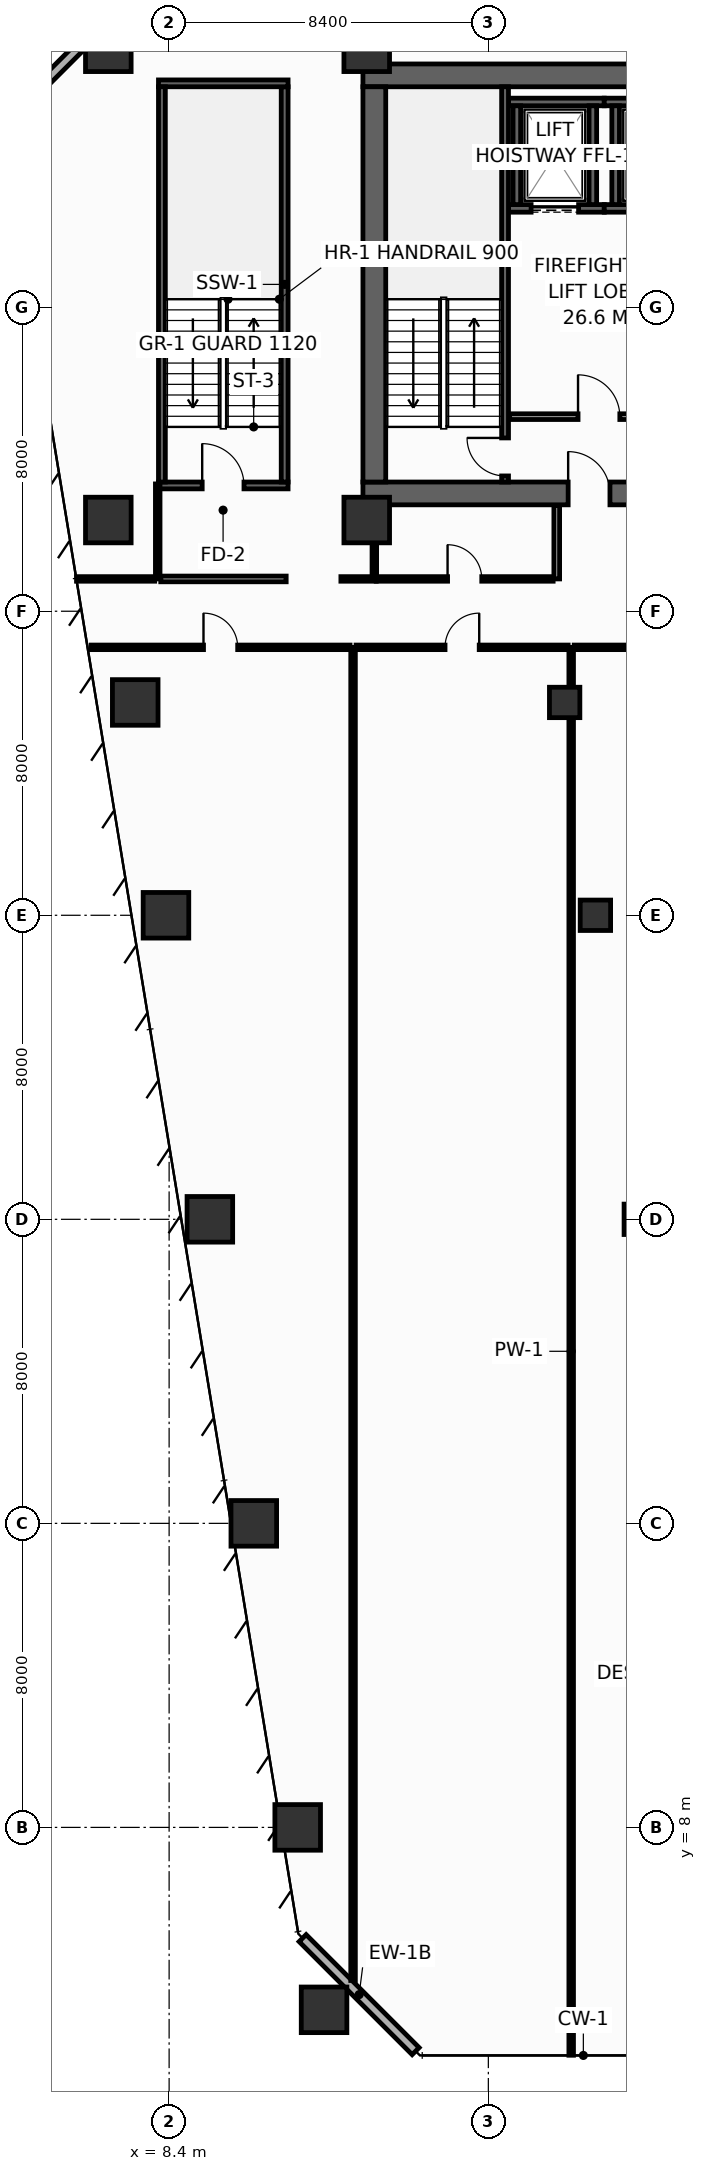
"""IFC4 building model, lengths in metres.
Left out: names, types, materials, properties, quantities, classifications, styles, units other than length and angle.
Written with IfcOpenShell. Run it as: python <this file> out.ifc"""

import sys

from ifc_helpers import new_model, si_unit, direction, frame, frame_2d, origin, origin_2d, place, context, subcontext, project, spatial, rectangle, hollow_rectangle, extrude, element, fill, save


model = new_model("IFC4")
c1 = context("Model", 3, precision=1e-05, world=origin(), true_north=direction((0.0, 1.0)))
c2 = subcontext(c1, "Body", "Model", "MODEL_VIEW")
j1 = project(units=[si_unit("LENGTHUNIT", "METRE"), si_unit("PLANEANGLEUNIT", "RADIAN")], contexts=[c1])
p1 = place(None, origin())
s1 = spatial("IfcSite", under=j1, at=p1, CompositionType="ELEMENT")
p2 = place(p1, origin())
s2 = spatial("IfcBuilding", under=s1, at=p2, CompositionType="ELEMENT")
p3 = place(p2, frame((0.0, 0.0, 69.2)))
s3 = spatial("IfcBuildingStorey", under=s2, at=p3, CompositionType="ELEMENT", Elevation=69.2)
p4 = place(p3, frame((13.5, 43.1, 0.0), z_axis=(0.0, 0.0, 1.0), x_axis=(1.0, 0.0, 0.0)))
e1 = element("IfcWall", 1, at=p4, inside=s3, PredefinedType="SHEAR", context=c2, shape_type="SweptSolid", body=[
    extrude(rectangle(XDim=32.9, YDim=0.6, at=frame_2d((16.45, 0.0))), origin(), (0.0, 0.0, 1.0), 4.15),
])
p5 = place(p4, frame((5.4, 0.0, 0.0)))
e2 = element("IfcOpeningElement", 2, at=p5, cuts=e1, PredefinedType="OPENING", context=c2, shape_type="SweptSolid", body=[
    extrude(rectangle(XDim=1.1, YDim=2.15, at=frame_2d((0.55, 1.075))), frame((0.0, 0.31, 0.0), z_axis=(0.0, -1.0, 0.0), x_axis=(1.0, 0.0, 0.0)), (0.0, 0.0, 1.0), 0.62),
])
p6 = place(p4, frame((25.6, 0.0, 0.0)))
e3 = element("IfcOpeningElement", 3, at=p6, cuts=e1, PredefinedType="OPENING", context=c2, shape_type="SweptSolid", body=[
    extrude(rectangle(XDim=1.1, YDim=2.15, at=frame_2d((0.55, 1.075))), frame((0.0, 0.31, 0.0), z_axis=(0.0, -1.0, 0.0), x_axis=(1.0, 0.0, 0.0)), (0.0, 0.0, 1.0), 0.62),
])
p7 = place(p3, frame((13.5, 54.1, 0.0), z_axis=(0.0, 0.0, 1.0), x_axis=(1.0, 0.0, 0.0)))
e4 = element("IfcWall", 4, at=p7, inside=s3, PredefinedType="SHEAR", context=c2, shape_type="SweptSolid", body=[
    extrude(rectangle(XDim=32.9, YDim=0.6, at=frame_2d((16.45, 0.0))), origin(), (0.0, 0.0, 1.0), 4.15),
])
p8 = place(p3, frame((13.8, 43.4, 0.0), z_axis=(0.0, 0.0, 1.0), x_axis=(0.0, 1.0, 0.0)))
e5 = element("IfcWall", 5, at=p8, inside=s3, PredefinedType="SHEAR", context=c2, shape_type="SweptSolid", body=[
    extrude(rectangle(XDim=10.4, YDim=0.6, at=frame_2d((5.2, 0.0))), origin(), (0.0, 0.0, 1.0), 4.15),
])
for number, where, z_axis, x_axis in (
    (6, (6.8, 54.8, 0.0), (0.0, 0.0, 1.0), (1.0, 0.0, 0.0)),
    (7, (13.6, 54.8, 0.0), (0.0, 0.0, 1.0), (1.0, 0.0, 0.0)),
    (8, (6.8, 42.4, 0.0), (0.0, 0.0, 1.0), (1.0, 0.0, 0.0)),
    (9, (13.6, 42.4, 0.0), (0.0, 0.0, 1.0), (1.0, 0.0, 0.0)),
    (10, (12.477, 3.2, 0.0), (0.0, 0.0, 1.0), (1.0, 0.0, 0.0)),
    (11, (11.783, 8.0, 0.0), (0.0, 0.0, 1.0), (1.0, 0.0, 0.0)),
    (12, (10.628, 16.0, 0.0), (0.0, 0.0, 1.0), (1.0, 0.0, 0.0)),
    (13, (9.472, 24.0, 0.0), (0.0, 0.0, 1.0), (1.0, 0.0, 0.0)),
):
    element("IfcColumn", number, at=place(p3, frame(where, z_axis=z_axis, x_axis=x_axis)), inside=s3, PredefinedType="COLUMN", context=c2, shape_type="SweptSolid", body=[
        extrude(hollow_rectangle(XDim=1.2, YDim=1.2, WallThickness=0.055, at=origin_2d()), origin(), (0.0, 0.0, 1.0), 4.4),
    ])
p9 = place(p3, frame((20.772, 24.0, 0.0), z_axis=(0.0, 0.0, 1.0), x_axis=(1.0, 0.0, 0.0)))
e14 = element("IfcColumn", 14, at=p9, inside=s3, PredefinedType="COLUMN", context=c2, shape_type="SweptSolid", body=[
    extrude(hollow_rectangle(XDim=0.8, YDim=0.8, WallThickness=0.036, at=origin_2d()), origin(), (0.0, 0.0, 1.0), 4.4),
])
p10 = place(p3, frame((8.317, 32.0, 0.0), z_axis=(0.0, 0.0, 1.0), x_axis=(1.0, 0.0, 0.0)))
e15 = element("IfcColumn", 15, at=p10, inside=s3, PredefinedType="COLUMN", context=c2, shape_type="SweptSolid", body=[
    extrude(hollow_rectangle(XDim=1.2, YDim=1.2, WallThickness=0.055, at=origin_2d()), origin(), (0.0, 0.0, 1.0), 4.4),
])
p11 = place(p3, frame((19.617, 32.0, 0.0), z_axis=(0.0, 0.0, 1.0), x_axis=(1.0, 0.0, 0.0)))
e16 = element("IfcColumn", 16, at=p11, inside=s3, PredefinedType="COLUMN", context=c2, shape_type="SweptSolid", body=[
    extrude(hollow_rectangle(XDim=0.8, YDim=0.8, WallThickness=0.036, at=origin_2d()), origin(), (0.0, 0.0, 1.0), 4.4),
])
p12 = place(p3, frame((7.508, 37.6, 0.0), z_axis=(0.0, 0.0, 1.0), x_axis=(1.0, 0.0, 0.0)))
e17 = element("IfcColumn", 17, at=p12, inside=s3, PredefinedType="COLUMN", context=c2, shape_type="SweptSolid", body=[
    extrude(hollow_rectangle(XDim=1.2, YDim=1.2, WallThickness=0.055, at=origin_2d()), origin(), (0.0, 0.0, 1.0), 4.4),
])
p13 = place(p3, frame((18.808, 37.6, 0.0), z_axis=(0.0, 0.0, 1.0), x_axis=(1.0, 0.0, 0.0)))
e18 = element("IfcColumn", 18, at=p13, inside=s3, PredefinedType="COLUMN", context=c2, shape_type="SweptSolid", body=[
    extrude(hollow_rectangle(XDim=0.8, YDim=0.8, WallThickness=0.036, at=origin_2d()), origin(), (0.0, 0.0, 1.0), 4.4),
])
p14 = place(p3, frame((17.33, 50.6, 0.0), z_axis=(0.0, 0.0, 1.0), x_axis=(1.0, 0.0, 0.0)))
e19 = element("IfcWall", 19, at=p14, inside=s3, PredefinedType="SHEAR", context=c2, shape_type="SweptSolid", body=[
    extrude(rectangle(XDim=2.52, YDim=0.2, at=frame_2d((1.26, 0.0))), origin(), (0.0, 0.0, 1.0), 4.15),
])
p15 = place(p14, frame((0.595, 0.0, 0.0)))
e20 = element("IfcOpeningElement", 20, at=p15, cuts=e19, PredefinedType="OPENING", context=c2, shape_type="SweptSolid", body=[
    extrude(rectangle(XDim=1.25, YDim=2.3, at=frame_2d((0.625, 1.15))), frame((0.0, 0.11, 0.0), z_axis=(0.0, -1.0, 0.0), x_axis=(1.0, 0.0, 0.0)), (0.0, 0.0, 1.0), 0.22),
])
p16 = place(p3, frame((17.33, 53.4, 0.0), z_axis=(0.0, 0.0, 1.0), x_axis=(1.0, 0.0, 0.0)))
e21 = element("IfcWall", 21, at=p16, inside=s3, PredefinedType="SHEAR", context=c2, shape_type="SweptSolid", body=[
    extrude(rectangle(XDim=2.52, YDim=0.2, at=frame_2d((1.26, 0.0))), origin(), (0.0, 0.0, 1.0), 4.15),
])
for number, where, z_axis, x_axis in (
    (22, (17.55, 50.7, 0.0), (0.0, 0.0, 1.0), (0.0, 1.0, 0.0)),
    (23, (19.55, 50.7, 0.0), (0.0, 0.0, 1.0), (0.0, 1.0, 0.0)),
):
    element("IfcWall", number, at=place(p3, frame(where, z_axis=z_axis, x_axis=x_axis)), inside=s3, PredefinedType="SHEAR", context=c2, shape_type="SweptSolid", body=[
        extrude(rectangle(XDim=2.6, YDim=0.2, at=frame_2d((1.3, 0.0))), origin(), (0.0, 0.0, 1.0), 4.15),
    ])
p17 = place(p3, frame((19.85, 50.6, 0.0), z_axis=(0.0, 0.0, 1.0), x_axis=(1.0, 0.0, 0.0)))
e24 = element("IfcWall", 24, at=p17, inside=s3, PredefinedType="SHEAR", context=c2, shape_type="SweptSolid", body=[
    extrude(rectangle(XDim=2.65, YDim=0.2, at=frame_2d((1.325, 0.0))), origin(), (0.0, 0.0, 1.0), 4.15),
])
p18 = place(p17, frame((0.675, 0.0, 0.0)))
e25 = element("IfcOpeningElement", 25, at=p18, cuts=e24, PredefinedType="OPENING", context=c2, shape_type="SweptSolid", body=[
    extrude(rectangle(XDim=1.25, YDim=2.3, at=frame_2d((0.625, 1.15))), frame((0.0, 0.11, 0.0), z_axis=(0.0, -1.0, 0.0), x_axis=(1.0, 0.0, 0.0)), (0.0, 0.0, 1.0), 0.22),
])
p19 = place(p3, frame((19.85, 53.4, 0.0), z_axis=(0.0, 0.0, 1.0), x_axis=(1.0, 0.0, 0.0)))
e26 = element("IfcWall", 26, at=p19, inside=s3, PredefinedType="SHEAR", context=c2, shape_type="SweptSolid", body=[
    extrude(rectangle(XDim=2.65, YDim=0.2, at=frame_2d((1.325, 0.0))), origin(), (0.0, 0.0, 1.0), 4.15),
])
p20 = place(p3, frame((20.15, 50.7, 0.0), z_axis=(0.0, 0.0, 1.0), x_axis=(0.0, 1.0, 0.0)))
e27 = element("IfcWall", 27, at=p20, inside=s3, PredefinedType="SHEAR", context=c2, shape_type="SweptSolid", body=[
    extrude(rectangle(XDim=2.6, YDim=0.2, at=frame_2d((1.3, 0.0))), origin(), (0.0, 0.0, 1.0), 4.15),
])
p21 = place(p3, frame((17.24, 43.4, 0.0), z_axis=(0.0, 0.0, 1.0), x_axis=(0.0, 1.0, 0.0)))
e28 = element("IfcWall", 28, at=p21, inside=s3, PredefinedType="SHEAR", context=c2, shape_type="SweptSolid", body=[
    extrude(rectangle(XDim=10.4, YDim=0.18, at=frame_2d((5.2, 0.0))), origin(), (0.0, 0.0, 1.0), 4.15),
])
p22 = place(p21, frame((0.16, 0.0, 0.0)))
e29 = element("IfcOpeningElement", 29, at=p22, cuts=e28, PredefinedType="OPENING", context=c2, shape_type="SweptSolid", body=[
    extrude(rectangle(XDim=1.0, YDim=2.15, at=frame_2d((0.5, 1.075))), frame((0.0, 0.1, 0.0), z_axis=(0.0, -1.0, 0.0), x_axis=(1.0, 0.0, 0.0)), (0.0, 0.0, 1.0), 0.2),
])
p23 = place(p3, frame((8.12, 43.31, 0.0), z_axis=(0.0, 0.0, 1.0), x_axis=(1.0, 0.0, 0.0)))
e30 = element("IfcWall", 30, at=p23, inside=s3, PredefinedType="SHEAR", context=c2, shape_type="SweptSolid", body=[
    extrude(rectangle(XDim=3.41, YDim=0.18, at=frame_2d((1.705, 0.0))), origin(), (0.0, 0.0, 1.0), 4.15),
])
p24 = place(p23, frame((1.15, 0.0, 0.0)))
e31 = element("IfcOpeningElement", 31, at=p24, cuts=e30, PredefinedType="OPENING", context=c2, shape_type="SweptSolid", body=[
    extrude(rectangle(XDim=1.1, YDim=2.15, at=frame_2d((0.55, 1.075))), frame((0.0, 0.1, 0.0), z_axis=(0.0, -1.0, 0.0), x_axis=(1.0, 0.0, 0.0)), (0.0, 0.0, 1.0), 0.2),
])
p25 = place(p3, frame((11.44, 43.4, 0.0), z_axis=(0.0, 0.0, 1.0), x_axis=(0.0, 1.0, 0.0)))
e32 = element("IfcWall", 32, at=p25, inside=s3, PredefinedType="SHEAR", context=c2, shape_type="SweptSolid", body=[
    extrude(rectangle(XDim=10.4, YDim=0.18, at=frame_2d((5.2, 0.0))), origin(), (0.0, 0.0, 1.0), 4.15),
])
p26 = place(p3, frame((11.53, 53.89, 0.0), z_axis=(0.0, 0.0, 1.0), x_axis=(-1.0, 0.0, 0.0)))
e33 = element("IfcWall", 33, at=p26, inside=s3, PredefinedType="SHEAR", context=c2, shape_type="SweptSolid", body=[
    extrude(rectangle(XDim=3.41, YDim=0.18, at=frame_2d((1.705, 0.0))), origin(), (0.0, 0.0, 1.0), 4.15),
])
p27 = place(p3, frame((8.21, 53.8, 0.0), z_axis=(0.0, 0.0, 1.0), x_axis=(0.0, -1.0, 0.0)))
e34 = element("IfcWall", 34, at=p27, inside=s3, PredefinedType="SHEAR", context=c2, shape_type="SweptSolid", body=[
    extrude(rectangle(XDim=10.4, YDim=0.18, at=frame_2d((5.2, 0.0))), origin(), (0.0, 0.0, 1.0), 4.15),
])
p28 = place(p3, frame((17.36, 45.12, 0.0), z_axis=(0.0, 0.0, 1.0), x_axis=(1.0, 0.0, 0.0)))
e35 = element("IfcWall", 35, at=p28, inside=s3, PredefinedType="PARTITIONING", context=c2, shape_type="SweptSolid", body=[
    extrude(rectangle(XDim=5.14, YDim=0.15, at=frame_2d((2.57, 0.0))), origin(), (0.0, 0.0, 1.0), 4.15),
])
p29 = place(p28, frame((1.8, 0.0, 0.0)))
e36 = element("IfcOpeningElement", 36, at=p29, cuts=e35, PredefinedType="OPENING", context=c2, shape_type="SweptSolid", body=[
    extrude(rectangle(XDim=1.1, YDim=2.15, at=frame_2d((0.55, 1.075))), frame((0.0, 0.085, 0.0), z_axis=(0.0, -1.0, 0.0), x_axis=(1.0, 0.0, 0.0)), (0.0, 0.0, 1.0), 0.17),
])
for number, where, z_axis, x_axis in (
    (37, (11.913, 5.087, 0.0), (0.0, 0.0, 1.0), (0.707, -0.707, 0.0)),
    (38, (7.087, 55.887, 0.0), (0.0, 0.0, 1.0), (-0.707, -0.707, 0.0)),
):
    element("IfcWall", number, at=place(p3, frame(where, z_axis=z_axis, x_axis=x_axis)), inside=s3, PredefinedType="STANDARD", context=c2, shape_type="SweptSolid", body=[
        extrude(rectangle(XDim=4.206, YDim=0.26, at=frame_2d((2.103, 0.0))), origin(), (0.0, 0.0, 1.0), 4.15),
    ])
p30 = place(p3, frame((12.92, 40.85, 0.0), z_axis=(0.0, 0.0, 1.0), x_axis=(1.0, 0.0, 0.0)))
e39 = element("IfcWall", 39, at=p30, inside=s3, PredefinedType="PARTITIONING", context=c2, shape_type="SweptSolid", body=[
    extrude(rectangle(XDim=0.93, YDim=0.12, at=frame_2d((0.465, 0.0))), origin(), (0.0, 0.0, 1.0), 4.15),
])
p31 = place(p3, frame((13.8, 40.93, 0.0), z_axis=(0.0, 0.0, 1.0), x_axis=(0.0, 1.0, 0.0)))
e40 = element("IfcWall", 40, at=p31, inside=s3, PredefinedType="PARTITIONING", context=c2, shape_type="SweptSolid", body=[
    extrude(rectangle(XDim=1.85, YDim=0.12, at=frame_2d((0.925, 0.0))), origin(), (0.0, 0.0, 1.0), 4.15),
])
p32 = place(p3, frame((8.1, 40.85, 0.0), z_axis=(0.0, 0.0, 1.0), x_axis=(0.0, 1.0, 0.0)))
e41 = element("IfcWall", 41, at=p32, inside=s3, PredefinedType="PARTITIONING", context=c2, shape_type="SweptSolid", body=[
    extrude(rectangle(XDim=2.5, YDim=0.12, at=frame_2d((1.25, 0.0))), origin(), (0.0, 0.0, 1.0), 3.335),
])
p33 = place(p3, frame((8.18, 40.85, 0.0), z_axis=(0.0, 0.0, 1.0), x_axis=(1.0, 0.0, 0.0)))
e42 = element("IfcWall", 42, at=p33, inside=s3, PredefinedType="PARTITIONING", context=c2, shape_type="SweptSolid", body=[
    extrude(rectangle(XDim=3.3, YDim=0.15, at=frame_2d((1.65, 0.0))), origin(), (0.0, 0.0, 1.0), 4.15),
])
p34 = place(p3, frame((5.963, 40.85, 0.0), z_axis=(0.0, 0.0, 1.0), x_axis=(1.0, 0.0, 0.0)))
e43 = element("IfcWall", 43, at=p34, inside=s3, PredefinedType="PARTITIONING", context=c2, shape_type="SweptSolid", body=[
    extrude(rectangle(XDim=2.057, YDim=0.12, at=frame_2d((1.028, 0.0))), origin(), (0.0, 0.0, 1.0), 3.635),
])
p35 = place(p3, frame((18.6, 40.85, 0.0), z_axis=(0.0, 0.0, 1.0), x_axis=(0.0, 1.0, 0.0)))
e44 = element("IfcWall", 44, at=p35, inside=s3, PredefinedType="PARTITIONING", context=c2, shape_type="SweptSolid", body=[
    extrude(rectangle(XDim=1.93, YDim=0.15, at=frame_2d((0.965, 0.0))), origin(), (0.0, 0.0, 1.0), 4.15),
])
p36 = place(p3, frame((13.85, 40.85, 0.0), z_axis=(0.0, 0.0, 1.0), x_axis=(1.0, 0.0, 0.0)))
e45 = element("IfcWall", 45, at=p36, inside=s3, PredefinedType="PARTITIONING", context=c2, shape_type="SweptSolid", body=[
    extrude(rectangle(XDim=4.655, YDim=0.12, at=frame_2d((2.327, 0.0))), origin(), (0.0, 0.0, 1.0), 4.15),
])
p37 = place(p36, frame((1.877, 0.0, 0.0)))
e46 = element("IfcOpeningElement", 46, at=p37, cuts=e45, PredefinedType="OPENING", context=c2, shape_type="SweptSolid", body=[
    extrude(rectangle(XDim=0.9, YDim=2.1, at=frame_2d((0.45, 1.05))), frame((0.0, 0.07, 0.0), z_axis=(0.0, -1.0, 0.0), x_axis=(1.0, 0.0, 0.0)), (0.0, 0.0, 1.0), 0.14),
])
p38 = place(p3, frame((13.24, 3.972, 0.0), z_axis=(0.0, 0.0, 1.0), x_axis=(0.0, 1.0, 0.0)))
e47 = element("IfcWall", 47, at=p38, inside=s3, PredefinedType="PARTITIONING", context=c2, shape_type="SweptSolid", body=[
    extrude(rectangle(XDim=35.078, YDim=0.12, at=frame_2d((17.539, 0.0))), origin(), (0.0, 0.0, 1.0), 3.335),
])
p39 = place(p3, frame((18.98, 2.005, 0.0), z_axis=(0.0, 0.0, 1.0), x_axis=(0.0, 1.0, 0.0)))
e48 = element("IfcWall", 48, at=p39, inside=s3, PredefinedType="PARTITIONING", context=c2, shape_type="SweptSolid", body=[
    extrude(rectangle(XDim=37.045, YDim=0.12, at=frame_2d((18.522, 0.0))), origin(), (0.0, 0.0, 1.0), 3.335),
])
p40 = place(p3, frame((6.348, 39.05, 0.0), z_axis=(0.0, 0.0, 1.0), x_axis=(1.0, 0.0, 0.0)))
e49 = element("IfcWall", 49, at=p40, inside=s3, PredefinedType="PARTITIONING", context=c2, shape_type="SweptSolid", body=[
    extrude(rectangle(XDim=6.812, YDim=0.12, at=frame_2d((3.406, 0.0))), origin(), (0.0, 0.0, 1.0), 3.635),
])
p41 = place(p40, frame((2.956, 0.0, 0.0)))
e50 = element("IfcOpeningElement", 50, at=p41, cuts=e49, PredefinedType="OPENING", context=c2, shape_type="SweptSolid", body=[
    extrude(rectangle(XDim=0.9, YDim=2.1, at=frame_2d((0.45, 1.05))), frame((0.0, 0.07, 0.0), z_axis=(0.0, -1.0, 0.0), x_axis=(1.0, 0.0, 0.0)), (0.0, 0.0, 1.0), 0.14),
])
p42 = place(p3, frame((13.32, 39.05, 0.0), z_axis=(0.0, 0.0, 1.0), x_axis=(1.0, 0.0, 0.0)))
e51 = element("IfcWall", 51, at=p42, inside=s3, PredefinedType="PARTITIONING", context=c2, shape_type="SweptSolid", body=[
    extrude(rectangle(XDim=5.58, YDim=0.12, at=frame_2d((2.79, 0.0))), origin(), (0.0, 0.0, 1.0), 4.15),
])
p43 = place(p42, frame((2.34, 0.0, 0.0)))
e52 = element("IfcOpeningElement", 52, at=p43, cuts=e51, PredefinedType="OPENING", context=c2, shape_type="SweptSolid", body=[
    extrude(rectangle(XDim=0.9, YDim=2.1, at=frame_2d((0.45, 1.05))), frame((0.0, 0.07, 0.0), z_axis=(0.0, -1.0, 0.0), x_axis=(1.0, 0.0, 0.0)), (0.0, 0.0, 1.0), 0.14),
])
p44 = place(p3, frame((19.06, 39.05, 0.0), z_axis=(0.0, 0.0, 1.0), x_axis=(1.0, 0.0, 0.0)))
e53 = element("IfcWall", 53, at=p44, inside=s3, PredefinedType="PARTITIONING", context=c2, shape_type="SweptSolid", body=[
    extrude(rectangle(XDim=4.79, YDim=0.12, at=frame_2d((2.395, 0.0))), origin(), (0.0, 0.0, 1.0), 3.335),
])
p45 = place(p44, frame((1.945, 0.0, 0.0)))
e54 = element("IfcOpeningElement", 54, at=p45, cuts=e53, PredefinedType="OPENING", context=c2, shape_type="SweptSolid", body=[
    extrude(rectangle(XDim=0.9, YDim=2.1, at=frame_2d((0.45, 1.05))), frame((0.0, 0.07, 0.0), z_axis=(0.0, -1.0, 0.0), x_axis=(1.0, 0.0, 0.0)), (0.0, 0.0, 1.0), 0.14),
])
p46 = place(p15, origin())
e55 = element("IfcDoor", 55, at=p46, inside=s3, OperationType="SLIDING_TO_LEFT", PredefinedType="DOOR", context=c2, shape_type="SweptSolid", body=[
    extrude(rectangle(XDim=1.25, YDim=2.3, at=frame_2d((0.625, 1.15))), frame((0.0, 0.025, 0.0), z_axis=(0.0, -1.0, 0.0), x_axis=(1.0, 0.0, 0.0)), (0.0, 0.0, 1.0), 0.05),
])
fill(e20, e55)
p47 = place(p22, origin())
e56 = element("IfcDoor", 56, at=p47, inside=s3, OperationType="SINGLE_SWING_RIGHT", PredefinedType="DOOR", context=c2, shape_type="SweptSolid", body=[
    extrude(rectangle(XDim=1.0, YDim=2.15, at=frame_2d((0.5, 1.075))), frame((0.0, 0.025, 0.0), z_axis=(0.0, -1.0, 0.0), x_axis=(1.0, 0.0, 0.0)), (0.0, 0.0, 1.0), 0.05),
])
fill(e29, e56)
p48 = place(p24, origin())
e57 = element("IfcDoor", 57, at=p48, inside=s3, OperationType="SINGLE_SWING_LEFT", PredefinedType="DOOR", context=c2, shape_type="SweptSolid", body=[
    extrude(rectangle(XDim=1.1, YDim=2.15, at=frame_2d((0.55, 1.075))), frame((0.0, 0.025, 0.0), z_axis=(0.0, -1.0, 0.0), x_axis=(1.0, 0.0, 0.0)), (0.0, 0.0, 1.0), 0.05),
])
fill(e31, e57)
p49 = place(p29, origin())
e58 = element("IfcDoor", 58, at=p49, inside=s3, OperationType="SINGLE_SWING_LEFT", PredefinedType="DOOR", context=c2, shape_type="SweptSolid", body=[
    extrude(rectangle(XDim=1.1, YDim=2.15, at=frame_2d((0.55, 1.075))), frame((0.0, 0.025, 0.0), z_axis=(0.0, -1.0, 0.0), x_axis=(1.0, 0.0, 0.0)), (0.0, 0.0, 1.0), 0.05),
])
fill(e36, e58)
p50 = place(p5, origin())
e59 = element("IfcDoor", 59, at=p50, inside=s3, OperationType="SINGLE_SWING_LEFT", PredefinedType="DOOR", context=c2, shape_type="SweptSolid", body=[
    extrude(rectangle(XDim=1.1, YDim=2.15, at=frame_2d((0.55, 1.075))), frame((0.0, 0.025, 0.0), z_axis=(0.0, -1.0, 0.0), x_axis=(1.0, 0.0, 0.0)), (0.0, 0.0, 1.0), 0.05),
])
fill(e2, e59)
p51 = place(p37, origin())
e60 = element("IfcDoor", 60, at=p51, inside=s3, OperationType="SINGLE_SWING_LEFT", PredefinedType="DOOR", context=c2, shape_type="SweptSolid", body=[
    extrude(rectangle(XDim=0.9, YDim=2.1, at=frame_2d((0.45, 1.05))), frame((0.0, 0.025, 0.0), z_axis=(0.0, -1.0, 0.0), x_axis=(1.0, 0.0, 0.0)), (0.0, 0.0, 1.0), 0.05),
])
fill(e46, e60)
p52 = place(p41, origin())
e61 = element("IfcDoor", 61, at=p52, inside=s3, OperationType="SINGLE_SWING_LEFT", PredefinedType="DOOR", context=c2, shape_type="SweptSolid", body=[
    extrude(rectangle(XDim=0.9, YDim=2.1, at=frame_2d((0.45, 1.05))), frame((0.0, 0.025, 0.0), z_axis=(0.0, -1.0, 0.0), x_axis=(1.0, 0.0, 0.0)), (0.0, 0.0, 1.0), 0.05),
])
fill(e50, e61)
p53 = place(p43, origin())
e62 = element("IfcDoor", 62, at=p53, inside=s3, OperationType="SINGLE_SWING_RIGHT", PredefinedType="DOOR", context=c2, shape_type="SweptSolid", body=[
    extrude(rectangle(XDim=0.9, YDim=2.1, at=frame_2d((0.45, 1.05))), frame((0.0, 0.025, 0.0), z_axis=(0.0, -1.0, 0.0), x_axis=(1.0, 0.0, 0.0)), (0.0, 0.0, 1.0), 0.05),
])
fill(e52, e62)
save(model, sys.argv[1])
